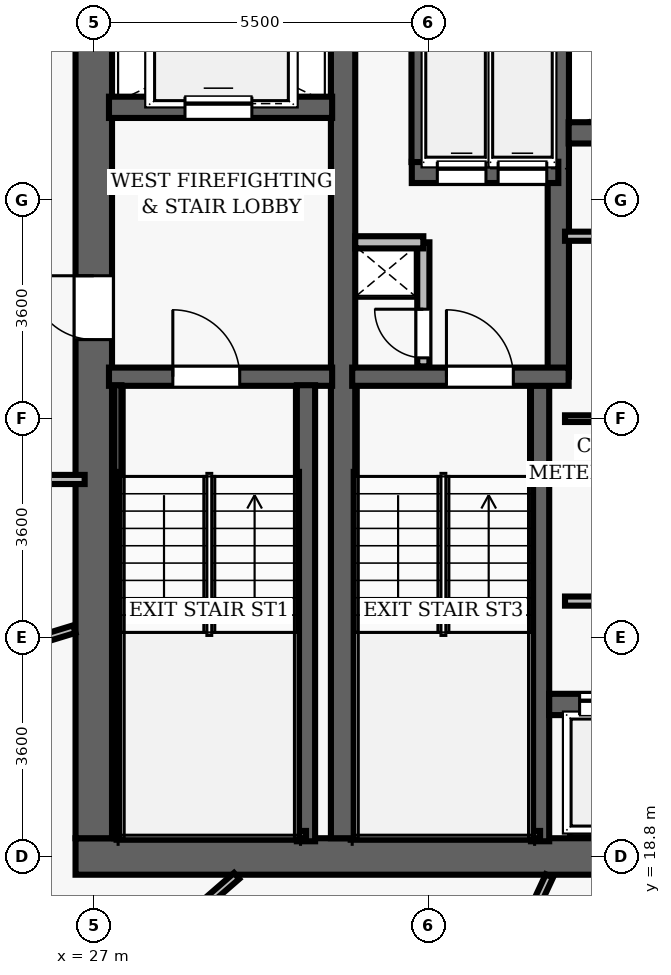
"""IFC4 building model, lengths in metres.
Left out: names, types, materials, properties, quantities, classifications, styles, units other than length and angle.
Written with IfcOpenShell. Run it as: python <this file> out.ifc"""

import sys

from ifc_helpers import new_model, si_unit, direction, frame, frame_2d, origin, place, context, subcontext, project, spatial, rectangle, extrude, element, fill, save


model = new_model("IFC4")
c1 = context("Model", 3, precision=1e-05, world=origin(), true_north=direction((0.0, 1.0)))
c2 = subcontext(c1, "Body", "Model", "MODEL_VIEW")
j1 = project(units=[si_unit("LENGTHUNIT", "METRE"), si_unit("PLANEANGLEUNIT", "RADIAN")], contexts=[c1])
p1 = place(None, origin())
s1 = spatial("IfcSite", under=j1, at=p1, CompositionType="ELEMENT")
p2 = place(p1, origin())
s2 = spatial("IfcBuilding", under=s1, at=p2, CompositionType="ELEMENT")
p3 = place(p2, frame((0.0, 0.0, 106.3)))
s3 = spatial("IfcBuildingStorey", under=s2, at=p3, CompositionType="ELEMENT", Elevation=106.3)
p4 = place(p3, frame((26.7, 18.8, 0.0), z_axis=(0.0, 0.0, 1.0), x_axis=(1.0, 0.0, 0.0)))
e1 = element("IfcWall", 1, at=p4, inside=s3, PredefinedType="SHEAR", context=c2, shape_type="SweptSolid", body=[
    extrude(rectangle(XDim=22.6, YDim=0.6, at=frame_2d((11.3, 0.0))), origin(), (0.0, 0.0, 1.0), 3.5),
])
p5 = place(p4, frame((14.52, 0.0, 0.0)))
e2 = element("IfcOpeningElement", 2, at=p5, cuts=e1, PredefinedType="OPENING", context=c2, shape_type="SweptSolid", body=[
    extrude(rectangle(XDim=1.05, YDim=2.15, at=frame_2d((0.525, 1.075))), frame((0.0, 0.31, 0.0), z_axis=(0.0, -1.0, 0.0), x_axis=(1.0, 0.0, 0.0)), (0.0, 0.0, 1.0), 0.62),
])
p6 = place(p3, frame((27.0, 19.1, 0.0), z_axis=(0.0, 0.0, 1.0), x_axis=(0.0, 1.0, 0.0)))
e3 = element("IfcWall", 3, at=p6, inside=s3, PredefinedType="SHEAR", context=c2, shape_type="SweptSolid", body=[
    extrude(rectangle(XDim=13.8, YDim=0.6, at=frame_2d((6.9, 0.0))), origin(), (0.0, 0.0, 1.0), 3.5),
])
p7 = place(p6, frame((8.2, 0.0, 0.0)))
e4 = element("IfcOpeningElement", 4, at=p7, cuts=e3, PredefinedType="OPENING", context=c2, shape_type="SweptSolid", body=[
    extrude(rectangle(XDim=1.05, YDim=2.15, at=frame_2d((0.525, 1.075))), frame((0.0, 0.31, 0.0), z_axis=(0.0, -1.0, 0.0), x_axis=(1.0, 0.0, 0.0)), (0.0, 0.0, 1.0), 0.62),
])
p8 = place(p3, frame((31.1, 19.1, 0.0), z_axis=(0.0, 0.0, 1.0), x_axis=(0.0, 1.0, 0.0)))
e5 = element("IfcWall", 5, at=p8, inside=s3, PredefinedType="SHEAR", context=c2, shape_type="SweptSolid", body=[
    extrude(rectangle(XDim=13.8, YDim=0.4, at=frame_2d((6.9, 0.0))), origin(), (0.0, 0.0, 1.0), 3.5),
])
p9 = place(p3, frame((27.25, 26.69, 0.0), z_axis=(0.0, 0.0, 1.0), x_axis=(1.0, 0.0, 0.0)))
e6 = element("IfcWall", 6, at=p9, inside=s3, PredefinedType="SHEAR", context=c2, shape_type="SweptSolid", body=[
    extrude(rectangle(XDim=3.67, YDim=0.3, at=frame_2d((1.835, 0.0))), origin(), (0.0, 0.0, 1.0), 3.5),
])
p10 = place(p9, frame((1.05, 0.0, 0.0)))
e7 = element("IfcOpeningElement", 7, at=p10, cuts=e6, PredefinedType="OPENING", context=c2, shape_type="SweptSolid", body=[
    extrude(rectangle(XDim=1.1, YDim=2.15, at=frame_2d((0.55, 1.075))), frame((0.0, 0.16, 0.0), z_axis=(0.0, -1.0, 0.0), x_axis=(1.0, 0.0, 0.0)), (0.0, 0.0, 1.0), 0.32),
])
p11 = place(p3, frame((30.49, 19.05, 0.0), z_axis=(0.0, 0.0, 1.0), x_axis=(0.0, 1.0, 0.0)))
e8 = element("IfcWall", 8, at=p11, inside=s3, PredefinedType="SHEAR", context=c2, shape_type="SweptSolid", body=[
    extrude(rectangle(XDim=7.5, YDim=0.3, at=frame_2d((3.75, 0.0))), origin(), (0.0, 0.0, 1.0), 3.5),
])
p12 = place(p3, frame((27.395, 19.1, 0.0), z_axis=(0.0, 0.0, 1.0), x_axis=(0.0, 1.0, 0.0)))
e9 = element("IfcWall", 9, at=p12, inside=s3, PredefinedType="SHEAR", context=c2, shape_type="SweptSolid", body=[
    extrude(rectangle(XDim=7.45, YDim=0.12, at=frame_2d((3.725, 0.0))), origin(), (0.0, 0.0, 1.0), 3.5),
])
p13 = place(p3, frame((27.395, 19.16, 0.0), z_axis=(0.0, 0.0, 1.0), x_axis=(1.0, 0.0, 0.0)))
e10 = element("IfcWall", 10, at=p13, inside=s3, PredefinedType="SHEAR", context=c2, shape_type="SweptSolid", body=[
    extrude(rectangle(XDim=3.095, YDim=0.12, at=frame_2d((1.547, 0.0))), origin(), (0.0, 0.0, 1.0), 3.5),
])
p14 = place(p3, frame((27.25, 31.12, 0.0), z_axis=(0.0, 0.0, 1.0), x_axis=(1.0, 0.0, 0.0)))
e11 = element("IfcWall", 11, at=p14, inside=s3, PredefinedType="SHEAR", context=c2, shape_type="SweptSolid", body=[
    extrude(rectangle(XDim=3.67, YDim=0.35, at=frame_2d((1.835, 0.0))), origin(), (0.0, 0.0, 1.0), 2.675),
])
p15 = place(p14, frame((1.25, 0.0, 0.0)))
e12 = element("IfcOpeningElement", 12, at=p15, cuts=e11, PredefinedType="OPENING", context=c2, shape_type="SweptSolid", body=[
    extrude(rectangle(XDim=1.1, YDim=2.15, at=frame_2d((0.55, 1.075))), frame((0.0, 0.185, 0.0), z_axis=(0.0, -1.0, 0.0), x_axis=(1.0, 0.0, 0.0)), (0.0, 0.0, 1.0), 0.37),
])
p16 = place(p3, frame((34.34, 19.05, 0.0), z_axis=(0.0, 0.0, 1.0), x_axis=(0.0, 1.0, 0.0)))
e13 = element("IfcWall", 13, at=p16, inside=s3, PredefinedType="SHEAR", context=c2, shape_type="SweptSolid", body=[
    extrude(rectangle(XDim=7.5, YDim=0.3, at=frame_2d((3.75, 0.0))), origin(), (0.0, 0.0, 1.0), 3.5),
])
p17 = place(p3, frame((34.64, 26.69, 0.0), z_axis=(0.0, 0.0, 1.0), x_axis=(0.0, 1.0, 0.0)))
e14 = element("IfcWall", 14, at=p17, inside=s3, PredefinedType="SHEAR", context=c2, shape_type="SweptSolid", body=[
    extrude(rectangle(XDim=6.26, YDim=0.35, at=frame_2d((3.13, 0.0))), origin(), (0.0, 0.0, 1.0), 3.5),
])
p18 = place(p3, frame((31.25, 26.69, 0.0), z_axis=(0.0, 0.0, 1.0), x_axis=(1.0, 0.0, 0.0)))
e15 = element("IfcWall", 15, at=p18, inside=s3, PredefinedType="SHEAR", context=c2, shape_type="SweptSolid", body=[
    extrude(rectangle(XDim=3.56, YDim=0.3, at=frame_2d((1.78, 0.0))), origin(), (0.0, 0.0, 1.0), 3.5),
])
p19 = place(p18, frame((1.55, 0.0, 0.0)))
e16 = element("IfcOpeningElement", 16, at=p19, cuts=e15, PredefinedType="OPENING", context=c2, shape_type="SweptSolid", body=[
    extrude(rectangle(XDim=1.1, YDim=2.15, at=frame_2d((0.55, 1.075))), frame((0.0, 0.16, 0.0), z_axis=(0.0, -1.0, 0.0), x_axis=(1.0, 0.0, 0.0)), (0.0, 0.0, 1.0), 0.32),
])
p20 = place(p3, frame((31.3, 19.16, 0.0), z_axis=(0.0, 0.0, 1.0), x_axis=(1.0, 0.0, 0.0)))
e17 = element("IfcWall", 17, at=p20, inside=s3, PredefinedType="SHEAR", context=c2, shape_type="SweptSolid", body=[
    extrude(rectangle(XDim=3.04, YDim=0.12, at=frame_2d((1.52, 0.0))), origin(), (0.0, 0.0, 1.0), 3.5),
])
p21 = place(p3, frame((32.23, 30.05, 0.0), z_axis=(0.0, 0.0, 1.0), x_axis=(1.0, 0.0, 0.0)))
e18 = element("IfcWall", 18, at=p21, inside=s3, PredefinedType="SHEAR", context=c2, shape_type="SweptSolid", body=[
    extrude(rectangle(XDim=2.41, YDim=0.35, at=frame_2d((1.205, 0.0))), origin(), (0.0, 0.0, 1.0), 2.675),
])
p22 = place(p21, frame((0.42, 0.0, 0.0)))
e19 = element("IfcOpeningElement", 19, at=p22, cuts=e18, PredefinedType="OPENING", context=c2, shape_type="SweptSolid", body=[
    extrude(rectangle(XDim=0.8, YDim=2.15, at=frame_2d((0.4, 1.075))), frame((0.0, 0.185, 0.0), z_axis=(0.0, -1.0, 0.0), x_axis=(1.0, 0.0, 0.0)), (0.0, 0.0, 1.0), 0.37),
])
p23 = place(p21, frame((1.42, 0.0, 0.0)))
e20 = element("IfcOpeningElement", 20, at=p23, cuts=e18, PredefinedType="OPENING", context=c2, shape_type="SweptSolid", body=[
    extrude(rectangle(XDim=0.8, YDim=2.15, at=frame_2d((0.4, 1.075))), frame((0.0, 0.185, 0.0), z_axis=(0.0, -1.0, 0.0), x_axis=(1.0, 0.0, 0.0)), (0.0, 0.0, 1.0), 0.37),
])
p24 = place(p3, frame((32.4, 30.22, 0.0), z_axis=(0.0, 0.0, 1.0), x_axis=(0.0, 1.0, 0.0)))
e21 = element("IfcWall", 21, at=p24, inside=s3, PredefinedType="SHEAR", context=c2, shape_type="SweptSolid", body=[
    extrude(rectangle(XDim=2.73, YDim=0.35, at=frame_2d((1.365, 0.0))), origin(), (0.0, 0.0, 1.0), 2.675),
])
p25 = place(p3, frame((32.42, 26.86, 0.0), z_axis=(0.0, 0.0, 1.0), x_axis=(0.0, 1.0, 0.0)))
e22 = element("IfcWall", 22, at=p25, inside=s3, PredefinedType="PARTITIONING", context=c2, shape_type="SweptSolid", body=[
    extrude(rectangle(XDim=2.04, YDim=0.2, at=frame_2d((1.02, 0.0))), origin(), (0.0, 0.0, 1.0), 2.675),
])
p26 = place(p25, frame((0.14, 0.0, 0.0)))
e23 = element("IfcOpeningElement", 23, at=p26, cuts=e22, PredefinedType="OPENING", context=c2, shape_type="SweptSolid", body=[
    extrude(rectangle(XDim=0.8, YDim=2.05, at=frame_2d((0.4, 1.025))), frame((0.0, 0.11, 0.0), z_axis=(0.0, -1.0, 0.0), x_axis=(1.0, 0.0, 0.0)), (0.0, 0.0, 1.0), 0.22),
])
p27 = place(p3, frame((31.3, 28.9, 0.0), z_axis=(0.0, 0.0, 1.0), x_axis=(1.0, 0.0, 0.0)))
e24 = element("IfcWall", 24, at=p27, inside=s3, PredefinedType="PARTITIONING", context=c2, shape_type="SweptSolid", body=[
    extrude(rectangle(XDim=1.12, YDim=0.2, at=frame_2d((0.56, 0.0))), origin(), (0.0, 0.0, 1.0), 2.675),
])
p28 = place(p3, frame((34.81, 30.7, 0.0), z_axis=(0.0, 0.0, 1.0), x_axis=(1.0, 0.0, 0.0)))
e25 = element("IfcWall", 25, at=p28, inside=s3, PredefinedType="SHEAR", context=c2, shape_type="SweptSolid", body=[
    extrude(rectangle(XDim=6.36, YDim=0.35, at=frame_2d((3.18, 0.0))), origin(), (0.0, 0.0, 1.0), 2.675),
])
p29 = place(p3, frame((34.49, 21.3, 0.0), z_axis=(0.0, 0.0, 1.0), x_axis=(1.0, 0.0, 0.0)))
e26 = element("IfcWall", 26, at=p29, inside=s3, PredefinedType="SHEAR", context=c2, shape_type="SweptSolid", body=[
    extrude(rectangle(XDim=6.68, YDim=0.35, at=frame_2d((3.34, 0.0))), origin(), (0.0, 0.0, 1.0), 2.675),
])
p30 = place(p29, frame((0.5, 0.0, 0.0)))
e27 = element("IfcOpeningElement", 27, at=p30, cuts=e26, PredefinedType="OPENING", context=c2, shape_type="SweptSolid", body=[
    extrude(rectangle(XDim=0.9, YDim=2.15, at=frame_2d((0.45, 1.075))), frame((0.0, 0.185, 0.0), z_axis=(0.0, -1.0, 0.0), x_axis=(1.0, 0.0, 0.0)), (0.0, 0.0, 1.0), 0.37),
])
p31 = place(p29, frame((2.58, 0.0, 0.0)))
e28 = element("IfcOpeningElement", 28, at=p31, cuts=e26, PredefinedType="OPENING", context=c2, shape_type="SweptSolid", body=[
    extrude(rectangle(XDim=0.9, YDim=2.15, at=frame_2d((0.45, 1.075))), frame((0.0, 0.185, 0.0), z_axis=(0.0, -1.0, 0.0), x_axis=(1.0, 0.0, 0.0)), (0.0, 0.0, 1.0), 0.37),
])
p32 = place(p29, frame((4.66, 0.0, 0.0)))
e29 = element("IfcOpeningElement", 29, at=p32, cuts=e26, PredefinedType="OPENING", context=c2, shape_type="SweptSolid", body=[
    extrude(rectangle(XDim=0.9, YDim=2.15, at=frame_2d((0.45, 1.075))), frame((0.0, 0.185, 0.0), z_axis=(0.0, -1.0, 0.0), x_axis=(1.0, 0.0, 0.0)), (0.0, 0.0, 1.0), 0.37),
])
for number, where, z_axis, x_axis in (
    (30, (34.75, 29.0, 0.0), (0.0, 0.0, 1.0), (1.0, 0.0, 0.0)),
    (31, (34.75, 23.0, 0.0), (0.0, 0.0, 1.0), (1.0, 0.0, 0.0)),
):
    element("IfcWall", number, at=place(p3, frame(where, z_axis=z_axis, x_axis=x_axis)), inside=s3, PredefinedType="PARTITIONING", context=c2, shape_type="SweptSolid", body=[
        extrude(rectangle(XDim=6.25, YDim=0.15, at=frame_2d((3.125, 0.0))), origin(), (0.0, 0.0, 1.0), 2.675),
    ])
p33 = place(p3, frame((34.75, 26.0, 0.0), z_axis=(0.0, 0.0, 1.0), x_axis=(1.0, 0.0, 0.0)))
e32 = element("IfcWall", 32, at=p33, inside=s3, PredefinedType="PARTITIONING", context=c2, shape_type="SweptSolid", body=[
    extrude(rectangle(XDim=6.25, YDim=0.11, at=frame_2d((3.125, 0.0))), origin(), (0.0, 0.0, 1.0), 2.675),
])
p34 = place(p3, frame((14.5, 25.0, 0.0), z_axis=(0.0, 0.0, 1.0), x_axis=(1.0, 0.0, 0.0)))
e33 = element("IfcWall", 33, at=p34, inside=s3, PredefinedType="PARTITIONING", context=c2, shape_type="SweptSolid", body=[
    extrude(rectangle(XDim=12.35, YDim=0.15, at=frame_2d((6.175, 0.0))), origin(), (0.0, 0.0, 1.0), 2.675),
])
p35 = place(p34, frame((8.788, 0.0, 0.0)))
e34 = element("IfcOpeningElement", 34, at=p35, cuts=e33, PredefinedType="OPENING", context=c2, shape_type="SweptSolid", body=[
    extrude(rectangle(XDim=0.95, YDim=2.15, at=frame_2d((0.475, 1.075))), frame((0.0, 0.085, 0.0), z_axis=(0.0, -1.0, 0.0), x_axis=(1.0, 0.0, 0.0)), (0.0, 0.0, 1.0), 0.17),
])
p36 = place(p3, frame((26.68, 22.539, 0.0), z_axis=(0.0, 0.0, 1.0), x_axis=(-0.956307870359, -0.292361517799, 0.0)))
e35 = element("IfcWall", 35, at=p36, inside=s3, PredefinedType="PARTITIONING", context=c2, shape_type="SweptSolid", body=[
    extrude(rectangle(XDim=14.749, YDim=0.13, at=frame_2d((7.375, 0.0))), origin(), (0.0, 0.0, 1.0), 2.675),
])
p37 = place(p3, frame((29.349, 18.48, 0.0), z_axis=(0.0, 0.0, 1.0), x_axis=(-0.754706894701, -0.656062118317, 0.0)))
e36 = element("IfcWall", 36, at=p37, inside=s3, PredefinedType="PARTITIONING", context=c2, shape_type="SweptSolid", body=[
    extrude(rectangle(XDim=12.805, YDim=0.13, at=frame_2d((6.403, 0.0))), origin(), (0.0, 0.0, 1.0), 2.675),
])
p38 = place(p3, frame((34.493, 18.48, 0.0), z_axis=(0.0, 0.0, 1.0), x_axis=(-0.422624514594, -0.906304871257, 0.0)))
e37 = element("IfcWall", 37, at=p38, inside=s3, PredefinedType="PARTITIONING", context=c2, shape_type="SweptSolid", body=[
    extrude(rectangle(XDim=14.803, YDim=0.13, at=frame_2d((7.401, 0.0))), origin(), (0.0, 0.0, 1.0), 2.675),
])
p39 = place(p10, origin())
e38 = element("IfcDoor", 38, at=p39, inside=s3, OperationType="SINGLE_SWING_LEFT", PredefinedType="DOOR", context=c2, shape_type="SweptSolid", body=[
    extrude(rectangle(XDim=1.1, YDim=2.15, at=frame_2d((0.55, 1.075))), frame((0.0, 0.025, 0.0), z_axis=(0.0, -1.0, 0.0), x_axis=(1.0, 0.0, 0.0)), (0.0, 0.0, 1.0), 0.05),
])
fill(e7, e38)
p40 = place(p7, origin())
e39 = element("IfcDoor", 39, at=p40, inside=s3, OperationType="SINGLE_SWING_RIGHT", PredefinedType="DOOR", context=c2, shape_type="SweptSolid", body=[
    extrude(rectangle(XDim=1.05, YDim=2.15, at=frame_2d((0.525, 1.075))), frame((0.0, 0.025, 0.0), z_axis=(0.0, -1.0, 0.0), x_axis=(1.0, 0.0, 0.0)), (0.0, 0.0, 1.0), 0.05),
])
fill(e4, e39)
p41 = place(p19, origin())
e40 = element("IfcDoor", 40, at=p41, inside=s3, OperationType="SINGLE_SWING_LEFT", PredefinedType="DOOR", context=c2, shape_type="SweptSolid", body=[
    extrude(rectangle(XDim=1.1, YDim=2.15, at=frame_2d((0.55, 1.075))), frame((0.0, 0.025, 0.0), z_axis=(0.0, -1.0, 0.0), x_axis=(1.0, 0.0, 0.0)), (0.0, 0.0, 1.0), 0.05),
])
fill(e16, e40)
p42 = place(p26, origin())
e41 = element("IfcDoor", 41, at=p42, inside=s3, OperationType="SINGLE_SWING_RIGHT", PredefinedType="DOOR", context=c2, shape_type="SweptSolid", body=[
    extrude(rectangle(XDim=0.8, YDim=2.05, at=frame_2d((0.4, 1.025))), frame((0.0, 0.025, 0.0), z_axis=(0.0, -1.0, 0.0), x_axis=(1.0, 0.0, 0.0)), (0.0, 0.0, 1.0), 0.05),
])
fill(e23, e41)
p43 = place(p30, origin())
e42 = element("IfcDoor", 42, at=p43, inside=s3, OperationType="SLIDING_TO_LEFT", PredefinedType="DOOR", context=c2, shape_type="SweptSolid", body=[
    extrude(rectangle(XDim=0.9, YDim=2.15, at=frame_2d((0.45, 1.075))), frame((0.0, 0.025, 0.0), z_axis=(0.0, -1.0, 0.0), x_axis=(1.0, 0.0, 0.0)), (0.0, 0.0, 1.0), 0.05),
])
fill(e27, e42)
p44 = place(p15, origin())
e43 = element("IfcDoor", 43, at=p44, inside=s3, OperationType="SLIDING_TO_LEFT", PredefinedType="DOOR", context=c2, shape_type="SweptSolid", body=[
    extrude(rectangle(XDim=1.1, YDim=2.15, at=frame_2d((0.55, 1.075))), frame((0.0, 0.025, 0.0), z_axis=(0.0, -1.0, 0.0), x_axis=(1.0, 0.0, 0.0)), (0.0, 0.0, 1.0), 0.05),
])
fill(e12, e43)
p45 = place(p22, origin())
e44 = element("IfcDoor", 44, at=p45, inside=s3, OperationType="SLIDING_TO_LEFT", PredefinedType="DOOR", context=c2, shape_type="SweptSolid", body=[
    extrude(rectangle(XDim=0.8, YDim=2.15, at=frame_2d((0.4, 1.075))), frame((0.0, 0.025, 0.0), z_axis=(0.0, -1.0, 0.0), x_axis=(1.0, 0.0, 0.0)), (0.0, 0.0, 1.0), 0.05),
])
fill(e19, e44)
p46 = place(p23, origin())
e45 = element("IfcDoor", 45, at=p46, inside=s3, OperationType="SLIDING_TO_LEFT", PredefinedType="DOOR", context=c2, shape_type="SweptSolid", body=[
    extrude(rectangle(XDim=0.8, YDim=2.15, at=frame_2d((0.4, 1.075))), frame((0.0, 0.025, 0.0), z_axis=(0.0, -1.0, 0.0), x_axis=(1.0, 0.0, 0.0)), (0.0, 0.0, 1.0), 0.05),
])
fill(e20, e45)
save(model, sys.argv[1])
